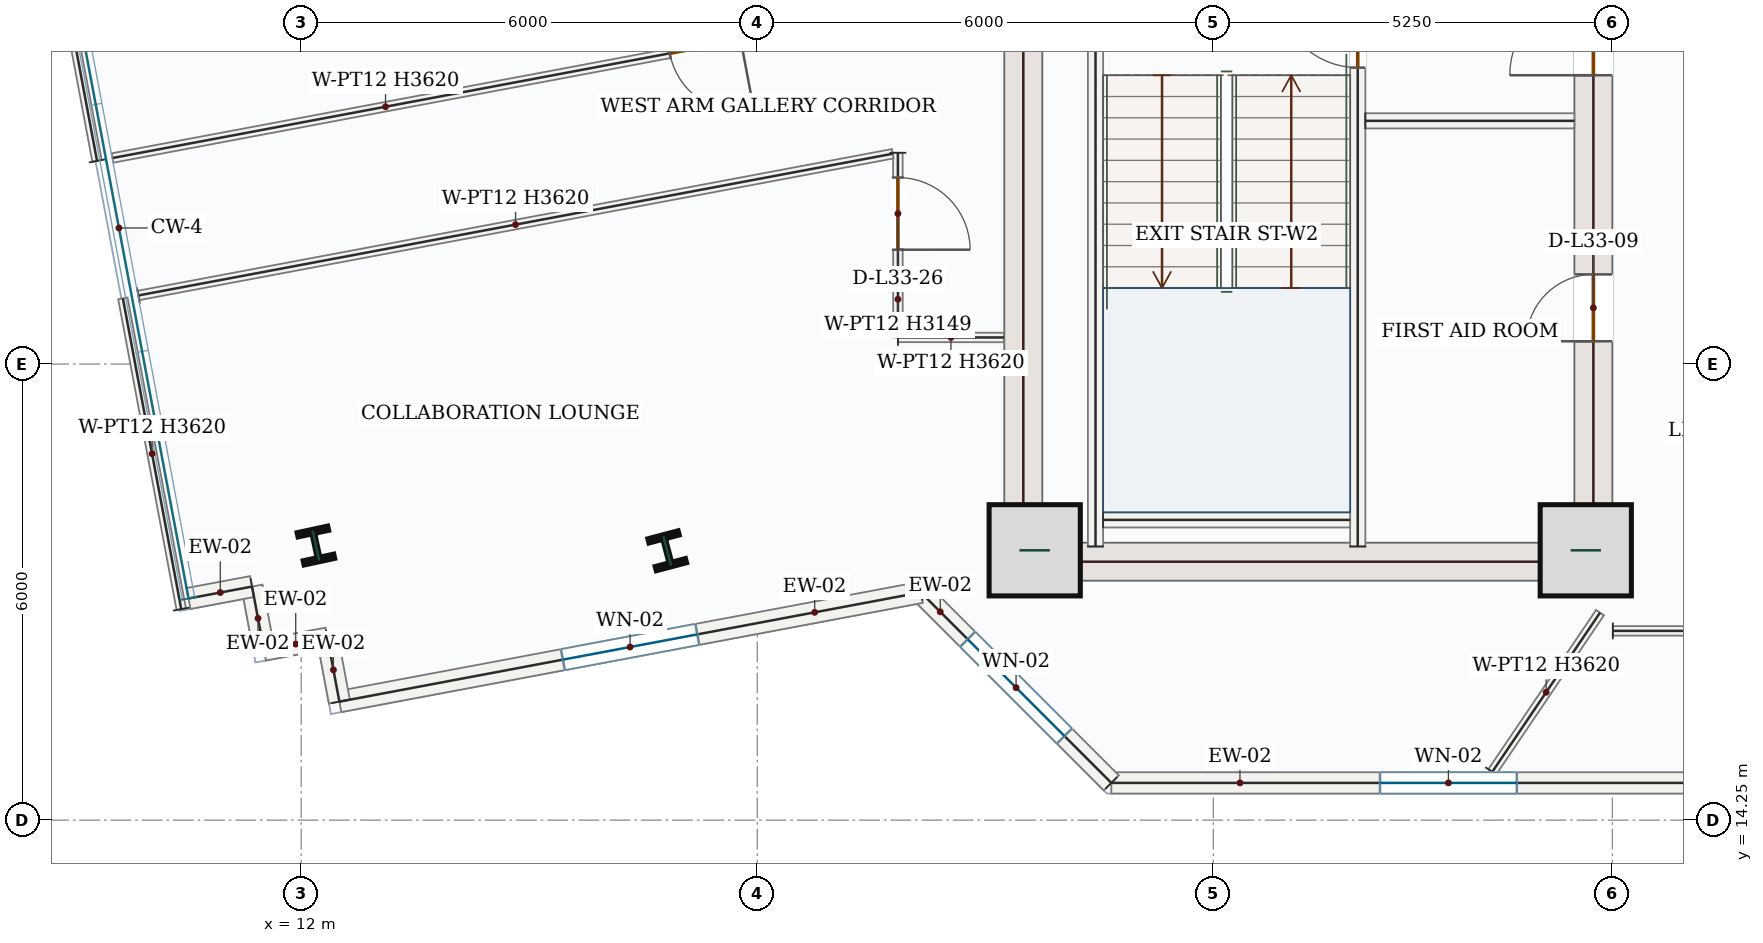
"""IFC4 building model, lengths in metres.
Left out: names, types, materials, properties, quantities, classifications, styles, units other than length and angle.
Written with IfcOpenShell. Run it as: python <this file> out.ifc"""

import sys

from ifc_helpers import new_model, si_unit, direction, frame, frame_2d, origin, origin_2d, place, context, subcontext, project, spatial, rectangle, i_section, extrude, source, transform, mapped, element, fill, save


model = new_model("IFC4")
c1 = context("Model", 3, precision=1e-05, world=origin(), true_north=direction((0.0, 1.0)))
c2 = subcontext(c1, "Body", "Model", "MODEL_VIEW")
j1 = project(units=[si_unit("LENGTHUNIT", "METRE"), si_unit("PLANEANGLEUNIT", "RADIAN")], contexts=[c1])
p1 = place(None, origin())
s1 = spatial("IfcSite", under=j1, at=p1, CompositionType="ELEMENT")
p2 = place(p1, origin())
s2 = spatial("IfcBuilding", under=s1, at=p2, CompositionType="ELEMENT")
p3 = place(p2, frame((0.0, 0.0, 147.3)))
s3 = spatial("IfcBuildingStorey", under=s2, at=p3, CompositionType="ELEMENT", Elevation=147.3)
m1 = source(origin(), c2, "Body", "SweptSolid", [
    extrude(rectangle(XDim=8.55, YDim=0.5, at=frame_2d((4.275, 0.0))), origin(), (0.0, 0.0, 1.0), 3.62),
])
p4 = place(p3, frame((21.5, 17.4, 0.0), z_axis=(0.0, 0.0, 1.0), x_axis=(0.0, 1.0, 0.0)))
e1 = element("IfcWall", 1, at=p4, inside=s3, PredefinedType="SHEAR", context=c2, shape_type="MappedRepresentation", body=[
    mapped(m1, transform((0.0, 0.0, 0.0), x_axis=(1.0, 0.0, 0.0), y_axis=(0.0, 1.0, 0.0), z_axis=(0.0, 0.0, 1.0), scale=1.0)),
])
p5 = place(p3, frame((29.0, 17.4, 0.0), z_axis=(0.0, 0.0, 1.0), x_axis=(0.0, 1.0, 0.0)))
e2 = element("IfcWall", 2, at=p5, inside=s3, PredefinedType="SHEAR", context=c2, shape_type="SweptSolid", body=[
    extrude(rectangle(XDim=8.55, YDim=0.5, at=frame_2d((4.275, 0.0))), origin(), (0.0, 0.0, 1.0), 3.62),
])
p6 = place(p5, frame((6.65, 0.0, 0.0)))
e3 = element("IfcOpeningElement", 3, at=p6, cuts=e2, PredefinedType="OPENING", context=c2, shape_type="SweptSolid", body=[
    extrude(rectangle(XDim=1.1, YDim=2.2, at=frame_2d((0.55, 1.1))), frame((0.0, 0.26, 0.0), z_axis=(0.0, -1.0, 0.0), x_axis=(1.0, 0.0, 0.0)), (0.0, 0.0, 1.0), 0.52),
])
p7 = place(p5, frame((3.15, 0.0, 0.0)))
e4 = element("IfcOpeningElement", 4, at=p7, cuts=e2, PredefinedType="OPENING", context=c2, shape_type="SweptSolid", body=[
    extrude(rectangle(XDim=0.88, YDim=2.1, at=frame_2d((0.44, 1.05))), frame((0.0, 0.26, 0.0), z_axis=(0.0, -1.0, 0.0), x_axis=(1.0, 0.0, 0.0)), (0.0, 0.0, 1.0), 0.52),
])
m2 = source(origin(), c2, "Body", "SweptSolid", [
    extrude(rectangle(XDim=7.0, YDim=0.5, at=frame_2d((3.5, 0.0))), origin(), (0.0, 0.0, 1.0), 3.62),
])
p8 = place(p3, frame((21.75, 17.65, 0.0), z_axis=(0.0, 0.0, 1.0), x_axis=(1.0, 0.0, 0.0)))
e5 = element("IfcWall", 5, at=p8, inside=s3, PredefinedType="SHEAR", context=c2, shape_type="MappedRepresentation", body=[
    mapped(m2, transform((0.0, 0.0, 0.0), x_axis=(1.0, 0.0, 0.0), y_axis=(0.0, 1.0, 0.0), z_axis=(0.0, 0.0, 1.0), scale=1.0)),
])
m3 = source(origin(), c2, "Body", "SweptSolid", [
    extrude(rectangle(XDim=1.2, YDim=1.2, at=origin_2d()), origin(), (0.0, 0.0, 1.0), 3.9),
])
for number, where, z_axis, x_axis in (
    (6, (21.65, 17.8, 0.0), (0.0, 0.0, 1.0), (1.0, 0.0, 0.0)),
    (7, (28.9, 17.8, 0.0), (0.0, 0.0, 1.0), (1.0, 0.0, 0.0)),
):
    element("IfcColumn", number, at=place(p3, frame(where, z_axis=z_axis, x_axis=x_axis)), inside=s3, PredefinedType="COLUMN", context=c2, shape_type="MappedRepresentation", body=[
        mapped(m3, transform((0.0, 0.0, 0.0), x_axis=(1.0, 0.0, 0.0), y_axis=(0.0, 1.0, 0.0), z_axis=(0.0, 0.0, 1.0), scale=1.0)),
    ])
m4 = source(origin(), c2, "Body", "SweptSolid", [
    extrude(i_section(OverallWidth=0.412, OverallDepth=0.435, WebThickness=0.036, FlangeThickness=0.057, FilletRadius=0.018, at=origin_2d()), origin(), (0.0, 0.0, 1.0), 3.9),
])
for number, where, z_axis, x_axis in (
    (8, (16.815, 17.794, 0.0), (0.0, 0.0, 1.0), (0.967, 0.255, 0.0)),
    (9, (12.193, 17.863, 0.0), (0.0, 0.0, 1.0), (0.977, 0.211, 0.0)),
):
    element("IfcColumn", number, at=place(p3, frame(where, z_axis=z_axis, x_axis=x_axis)), inside=s3, PredefinedType="COLUMN", context=c2, shape_type="MappedRepresentation", body=[
        mapped(m4, transform((0.0, 0.0, 0.0), x_axis=(1.0, 0.0, 0.0), y_axis=(0.0, 1.0, 0.0), z_axis=(0.0, 0.0, 1.0), scale=1.0)),
    ])
p9 = place(p3, frame((31.527, 14.74, 0.0), z_axis=(0.0, 0.0, 1.0), x_axis=(-1.0, 0.0, 0.0)))
e10 = element("IfcWall", 10, at=p9, inside=s3, PredefinedType="SOLIDWALL", context=c2, shape_type="SweptSolid", body=[
    extrude(rectangle(XDim=8.869, YDim=0.28, at=frame_2d((4.434, 0.0))), origin(), (0.0, 0.0, 1.0), 3.62),
])
p10 = place(p9, frame((3.534, 0.0, 0.85)))
e11 = element("IfcOpeningElement", 11, at=p10, cuts=e10, PredefinedType="OPENING", context=c2, shape_type="SweptSolid", body=[
    extrude(rectangle(XDim=1.8, YDim=1.75, at=frame_2d((0.9, 0.875))), frame((0.0, 0.15, 0.0), z_axis=(0.0, -1.0, 0.0), x_axis=(1.0, 0.0, 0.0)), (0.0, 0.0, 1.0), 0.3),
])
p11 = place(p3, frame((22.658, 14.74, 0.0), z_axis=(0.0, 0.0, 1.0), x_axis=(-0.707106781187, 0.707106781187, 0.0)))
e12 = element("IfcWall", 12, at=p11, inside=s3, PredefinedType="SOLIDWALL", context=c2, shape_type="SweptSolid", body=[
    extrude(rectangle(XDim=3.544, YDim=0.28, at=frame_2d((1.772, 0.0))), origin(), (0.0, 0.0, 1.0), 3.62),
])
p12 = place(p11, frame((0.872, 0.0, 0.85)))
e13 = element("IfcOpeningElement", 13, at=p12, cuts=e12, PredefinedType="OPENING", context=c2, shape_type="SweptSolid", body=[
    extrude(rectangle(XDim=1.8, YDim=1.75, at=frame_2d((0.9, 0.875))), frame((0.0, 0.15, 0.0), z_axis=(0.0, -1.0, 0.0), x_axis=(1.0, 0.0, 0.0)), (0.0, 0.0, 1.0), 0.3),
])
p13 = place(p3, frame((20.152, 17.246, 0.0), z_axis=(0.0, 0.0, 1.0), x_axis=(-0.982809278234, -0.18462373254, 0.0)))
e14 = element("IfcWall", 14, at=p13, inside=s3, PredefinedType="SOLIDWALL", context=c2, shape_type="SweptSolid", body=[
    extrude(rectangle(XDim=7.783, YDim=0.28, at=frame_2d((3.892, 0.0))), origin(), (0.0, 0.0, 1.0), 3.62),
])
p14 = place(p13, frame((2.992, 0.0, 0.85)))
e15 = element("IfcOpeningElement", 15, at=p14, cuts=e14, PredefinedType="OPENING", context=c2, shape_type="SweptSolid", body=[
    extrude(rectangle(XDim=1.8, YDim=1.75, at=frame_2d((0.9, 0.875))), frame((0.0, 0.15, 0.0), z_axis=(0.0, -1.0, 0.0), x_axis=(1.0, 0.0, 0.0)), (0.0, 0.0, 1.0), 0.3),
])
m5 = source(origin(), c2, "Body", "SweptSolid", [
    extrude(rectangle(XDim=0.85, YDim=0.28, at=frame_2d((0.425, 0.0))), origin(), (0.0, 0.0, 1.0), 3.62),
])
p15 = place(p3, frame((12.502, 15.809, 0.0), z_axis=(0.0, 0.0, 1.0), x_axis=(-0.184670010318, 0.982800583684, 0.0)))
e16 = element("IfcWall", 16, at=p15, inside=s3, PredefinedType="SOLIDWALL", context=c2, shape_type="MappedRepresentation", body=[
    mapped(m5, transform((0.0, 0.0, 0.0), x_axis=(1.0, 0.0, 0.0), y_axis=(0.0, 1.0, 0.0), z_axis=(0.0, 0.0, 1.0), scale=1.0)),
])
m6 = source(origin(), c2, "Body", "SweptSolid", [
    extrude(rectangle(XDim=0.85, YDim=0.28, at=frame_2d((0.425, 0.0))), origin(), (0.0, 0.0, 1.0), 3.62),
])
for number, where, z_axis, x_axis in (
    (17, (12.345, 16.645, 0.0), (0.0, 0.0, 1.0), (-0.983, -0.185, 0.0)),
    (18, (11.51, 16.488, 0.0), (0.0, 0.0, 1.0), (-0.185, 0.983, 0.0)),
):
    element("IfcWall", number, at=place(p3, frame(where, z_axis=z_axis, x_axis=x_axis)), inside=s3, PredefinedType="SOLIDWALL", context=c2, shape_type="MappedRepresentation", body=[
        mapped(m6, transform((0.0, 0.0, 0.0), x_axis=(1.0, 0.0, 0.0), y_axis=(0.0, 1.0, 0.0), z_axis=(0.0, 0.0, 1.0), scale=1.0)),
    ])
p16 = place(p3, frame((11.353, 17.323, 0.0), z_axis=(0.0, 0.0, 1.0), x_axis=(-0.982852672425, -0.184392582027, 0.0)))
e19 = element("IfcWall", 19, at=p16, inside=s3, PredefinedType="SOLIDWALL", context=c2, shape_type="MappedRepresentation", body=[
    mapped(m5, transform((0.0, 0.0, 0.0), x_axis=(1.0, 0.0, 0.0), y_axis=(0.0, 1.0, 0.0), z_axis=(0.0, 0.0, 1.0), scale=1.0)),
])
m7 = source(origin(), c2, "Body", "SweptSolid", [
    extrude(rectangle(XDim=7.87, YDim=0.2, at=frame_2d((3.935, 0.0))), origin(), (0.0, 0.0, 1.0), 3.62),
])
p17 = place(p3, frame((22.45, 17.85, 0.0), z_axis=(0.0, 0.0, 1.0), x_axis=(0.0, 1.0, 0.0)))
e20 = element("IfcWall", 20, at=p17, inside=s3, PredefinedType="SOLIDWALL", context=c2, shape_type="MappedRepresentation", body=[
    mapped(m7, transform((0.0, 0.0, 0.0), x_axis=(1.0, 0.0, 0.0), y_axis=(0.0, 1.0, 0.0), z_axis=(0.0, 0.0, 1.0), scale=1.0)),
])
p18 = place(p3, frame((25.9, 17.85, 0.0), z_axis=(0.0, 0.0, 1.0), x_axis=(0.0, 1.0, 0.0)))
e21 = element("IfcWall", 21, at=p18, inside=s3, PredefinedType="SOLIDWALL", context=c2, shape_type="SweptSolid", body=[
    extrude(rectangle(XDim=8.0, YDim=0.2, at=frame_2d((4.0, 0.0))), origin(), (0.0, 0.0, 1.0), 3.62),
])
p19 = place(p18, frame((6.3, 0.0, 0.0)))
e22 = element("IfcOpeningElement", 22, at=p19, cuts=e21, PredefinedType="OPENING", context=c2, shape_type="SweptSolid", body=[
    extrude(rectangle(XDim=1.05, YDim=2.15, at=frame_2d((0.525, 1.075))), frame((0.0, 0.11, 0.0), z_axis=(0.0, -1.0, 0.0), x_axis=(1.0, 0.0, 0.0)), (0.0, 0.0, 1.0), 0.22),
])
m8 = source(origin(), c2, "Body", "SweptSolid", [
    extrude(rectangle(XDim=3.25, YDim=0.2, at=frame_2d((1.625, 0.0))), origin(), (0.0, 0.0, 1.0), 3.62),
])
p20 = place(p3, frame((22.55, 18.2, 0.0), z_axis=(0.0, 0.0, 1.0), x_axis=(1.0, 0.0, 0.0)))
e23 = element("IfcWall", 23, at=p20, inside=s3, PredefinedType="SOLIDWALL", context=c2, shape_type="MappedRepresentation", body=[
    mapped(m8, transform((0.0, 0.0, 0.0), x_axis=(1.0, 0.0, 0.0), y_axis=(0.0, 1.0, 0.0), z_axis=(0.0, 0.0, 1.0), scale=1.0)),
])
m9 = source(origin(), c2, "Body", "SweptSolid", [
    extrude(rectangle(XDim=2.75, YDim=0.2, at=frame_2d((1.375, 0.0))), origin(), (0.0, 0.0, 1.0), 3.62),
])
p21 = place(p3, frame((26.0, 23.45, 0.0), z_axis=(0.0, 0.0, 1.0), x_axis=(1.0, 0.0, 0.0)))
e24 = element("IfcWall", 24, at=p21, inside=s3, PredefinedType="SOLIDWALL", context=c2, shape_type="MappedRepresentation", body=[
    mapped(m9, transform((0.0, 0.0, 0.0), x_axis=(1.0, 0.0, 0.0), y_axis=(0.0, 1.0, 0.0), z_axis=(0.0, 0.0, 1.0), scale=1.0)),
])
p22 = place(p3, frame((29.256, 16.74, 0.0), z_axis=(0.0, 0.0, 1.0), x_axis=(1.0, 0.0, 0.0)))
e25 = element("IfcWall", 25, at=p22, inside=s3, PredefinedType="PARTITIONING", context=c2, shape_type="SweptSolid", body=[
    extrude(rectangle(XDim=7.736, YDim=0.125, at=frame_2d((3.868, 0.0))), origin(), (0.0, 0.0, 1.0), 3.62),
])
p23 = place(p22, frame((5.293, 0.0, 0.0)))
e26 = element("IfcOpeningElement", 26, at=p23, cuts=e25, PredefinedType="OPENING", context=c2, shape_type="SweptSolid", body=[
    extrude(rectangle(XDim=0.95, YDim=2.15, at=frame_2d((0.475, 1.075))), frame((0.0, 0.073, 0.0), z_axis=(0.0, -1.0, 0.0), x_axis=(1.0, 0.0, 0.0)), (0.0, 0.0, 1.0), 0.145),
])
m10 = source(origin(), c2, "Body", "SweptSolid", [
    extrude(rectangle(XDim=2.53, YDim=0.125, at=frame_2d((1.265, 0.0))), origin(), (0.0, 0.0, 1.0), 3.62),
])
p24 = place(p3, frame((27.67, 14.885, 0.0), z_axis=(0.0, 0.0, 1.0), x_axis=(0.560455418396, 0.82818459536, 0.0)))
e27 = element("IfcWall", 27, at=p24, inside=s3, PredefinedType="PARTITIONING", context=c2, shape_type="MappedRepresentation", body=[
    mapped(m10, transform((0.0, 0.0, 0.0), x_axis=(1.0, 0.0, 0.0), y_axis=(0.0, 1.0, 0.0), z_axis=(0.0, 0.0, 1.0), scale=1.0)),
])
m11 = source(origin(), c2, "Body", "SweptSolid", [
    extrude(rectangle(XDim=4.16, YDim=0.125, at=frame_2d((2.08, 0.0))), origin(), (0.0, 0.0, 1.0), 3.62),
])
p25 = place(p3, frame((9.314, 22.923, 0.0), z_axis=(0.0, 0.0, 1.0), x_axis=(-0.184635785614, 0.982807013951, 0.0)))
e28 = element("IfcWall", 28, at=p25, inside=s3, PredefinedType="PARTITIONING", context=c2, shape_type="MappedRepresentation", body=[
    mapped(m11, transform((0.0, 0.0, 0.0), x_axis=(1.0, 0.0, 0.0), y_axis=(0.0, 1.0, 0.0), z_axis=(0.0, 0.0, 1.0), scale=1.0)),
])
p26 = place(p3, frame((19.85, 24.902, 0.0), z_axis=(0.0, 0.0, 1.0), x_axis=(-0.982804817995, -0.184647474194, 0.0)))
e29 = element("IfcWall", 29, at=p26, inside=s3, PredefinedType="PARTITIONING", context=c2, shape_type="SweptSolid", body=[
    extrude(rectangle(XDim=10.513, YDim=0.125, at=frame_2d((5.256, 0.0))), origin(), (0.0, 0.0, 1.0), 3.62),
])
p27 = place(p26, frame((2.104, 0.0, 0.0)))
e30 = element("IfcOpeningElement", 30, at=p27, cuts=e29, PredefinedType="OPENING", context=c2, shape_type="SweptSolid", body=[
    extrude(rectangle(XDim=0.95, YDim=2.15, at=frame_2d((0.475, 1.075))), frame((0.0, 0.073, 0.0), z_axis=(0.0, -1.0, 0.0), x_axis=(1.0, 0.0, 0.0)), (0.0, 0.0, 1.0), 0.145),
])
p28 = place(p3, frame((19.85, 23.03, 0.0), z_axis=(0.0, 0.0, 1.0), x_axis=(0.00040209084, -0.999999919161, 0.0)))
e31 = element("IfcWall", 31, at=p28, inside=s3, PredefinedType="PARTITIONING", context=c2, shape_type="SweptSolid", body=[
    extrude(rectangle(XDim=2.429, YDim=0.125, at=frame_2d((1.214, 0.0))), origin(), (0.0, 0.0, 1.0), 3.149),
])
p29 = place(p28, frame((0.325, 0.0, 0.0)))
e32 = element("IfcOpeningElement", 32, at=p29, cuts=e31, PredefinedType="OPENING", context=c2, shape_type="SweptSolid", body=[
    extrude(rectangle(XDim=0.95, YDim=2.15, at=frame_2d((0.475, 1.075))), frame((0.0, 0.073, 0.0), z_axis=(0.0, -1.0, 0.0), x_axis=(1.0, 0.0, 0.0)), (0.0, 0.0, 1.0), 0.145),
])
m12 = source(origin(), c2, "Body", "SweptSolid", [
    extrude(rectangle(XDim=1.394, YDim=0.125, at=frame_2d((0.697, 0.0))), origin(), (0.0, 0.0, 1.0), 3.62),
])
p30 = place(p3, frame((19.851, 20.601, 0.0), z_axis=(0.0, 0.0, 1.0), x_axis=(0.999999754632, -0.000700525222, 0.0)))
e33 = element("IfcWall", 33, at=p30, inside=s3, PredefinedType="PARTITIONING", context=c2, shape_type="MappedRepresentation", body=[
    mapped(m12, transform((0.0, 0.0, 0.0), x_axis=(1.0, 0.0, 0.0), y_axis=(0.0, 1.0, 0.0), z_axis=(0.0, 0.0, 1.0), scale=1.0)),
])
p31 = place(p3, frame((10.422, 17.026, 0.0), z_axis=(0.0, 0.0, 1.0), x_axis=(-0.184635785614, 0.982807013951, 0.0)))
e34 = element("IfcWall", 34, at=p31, inside=s3, PredefinedType="PARTITIONING", context=c2, shape_type="MappedRepresentation", body=[
    mapped(m11, transform((0.0, 0.0, 0.0), x_axis=(1.0, 0.0, 0.0), y_axis=(0.0, 1.0, 0.0), z_axis=(0.0, 0.0, 1.0), scale=1.0)),
])
m13 = source(origin(), c2, "Body", "SweptSolid", [
    extrude(rectangle(XDim=10.098, YDim=0.125, at=frame_2d((5.049, 0.0))), origin(), (0.0, 0.0, 1.0), 3.62),
])
p32 = place(p3, frame((9.858, 21.153, 0.0), z_axis=(0.0, 0.0, 1.0), x_axis=(0.982807535277, 0.1846330106, 0.0)))
e35 = element("IfcWall", 35, at=p32, inside=s3, PredefinedType="PARTITIONING", context=c2, shape_type="MappedRepresentation", body=[
    mapped(m13, transform((0.0, 0.0, 0.0), x_axis=(1.0, 0.0, 0.0), y_axis=(0.0, 1.0, 0.0), z_axis=(0.0, 0.0, 1.0), scale=1.0)),
])
m14 = source(origin(), c2, "Body", "SweptSolid", [
    extrude(rectangle(XDim=1.8, YDim=1.75, at=frame_2d((0.9, 0.875))), frame((0.0, 0.03, 0.0), z_axis=(0.0, -1.0, 0.0), x_axis=(1.0, 0.0, 0.0)), (0.0, 0.0, 1.0), 0.06),
])
p33 = place(p10, origin())
e36 = element("IfcWindow", 36, at=p33, inside=s3, PartitioningType="DOUBLE_PANEL_VERTICAL", PredefinedType="WINDOW", context=c2, shape_type="MappedRepresentation", body=[
    mapped(m14, transform((0.0, 0.0, 0.0), x_axis=(1.0, 0.0, 0.0), y_axis=(0.0, 1.0, 0.0), z_axis=(0.0, 0.0, 1.0), scale=1.0)),
])
fill(e11, e36)
p34 = place(p12, origin())
e37 = element("IfcWindow", 37, at=p34, inside=s3, PartitioningType="DOUBLE_PANEL_VERTICAL", PredefinedType="WINDOW", context=c2, shape_type="MappedRepresentation", body=[
    mapped(m14, transform((0.0, 0.0, 0.0), x_axis=(1.0, 0.0, 0.0), y_axis=(0.0, 1.0, 0.0), z_axis=(0.0, 0.0, 1.0), scale=1.0)),
])
fill(e13, e37)
p35 = place(p14, origin())
e38 = element("IfcWindow", 38, at=p35, inside=s3, PartitioningType="DOUBLE_PANEL_VERTICAL", PredefinedType="WINDOW", context=c2, shape_type="MappedRepresentation", body=[
    mapped(m14, transform((0.0, 0.0, 0.0), x_axis=(1.0, 0.0, 0.0), y_axis=(0.0, 1.0, 0.0), z_axis=(0.0, 0.0, 1.0), scale=1.0)),
])
fill(e15, e38)
m15 = source(origin(), c2, "Body", "SweptSolid", [
    extrude(rectangle(XDim=1.05, YDim=2.15, at=frame_2d((0.525, 1.075))), frame((0.0, 0.025, 0.0), z_axis=(0.0, -1.0, 0.0), x_axis=(1.0, 0.0, 0.0)), (0.0, 0.0, 1.0), 0.05),
])
p36 = place(p19, origin())
e39 = element("IfcDoor", 39, at=p36, inside=s3, OperationType="SINGLE_SWING_RIGHT", PredefinedType="DOOR", context=c2, shape_type="MappedRepresentation", body=[
    mapped(m15, transform((0.0, 0.0, 0.0), x_axis=(1.0, 0.0, 0.0), y_axis=(0.0, 1.0, 0.0), z_axis=(0.0, 0.0, 1.0), scale=1.0)),
])
fill(e22, e39)
m16 = source(origin(), c2, "Body", "SweptSolid", [
    extrude(rectangle(XDim=1.1, YDim=2.2, at=frame_2d((0.55, 1.1))), frame((0.0, 0.025, 0.0), z_axis=(0.0, -1.0, 0.0), x_axis=(1.0, 0.0, 0.0)), (0.0, 0.0, 1.0), 0.05),
])
p37 = place(p6, origin())
e40 = element("IfcDoor", 40, at=p37, inside=s3, OperationType="SINGLE_SWING_LEFT", PredefinedType="DOOR", context=c2, shape_type="MappedRepresentation", body=[
    mapped(m16, transform((0.0, 0.0, 0.0), x_axis=(1.0, 0.0, 0.0), y_axis=(0.0, 1.0, 0.0), z_axis=(0.0, 0.0, 1.0), scale=1.0)),
])
fill(e3, e40)
m17 = source(origin(), c2, "Body", "SweptSolid", [
    extrude(rectangle(XDim=0.88, YDim=2.1, at=frame_2d((0.44, 1.05))), frame((0.0, 0.025, 0.0), z_axis=(0.0, -1.0, 0.0), x_axis=(1.0, 0.0, 0.0)), (0.0, 0.0, 1.0), 0.05),
])
p38 = place(p7, origin())
e41 = element("IfcDoor", 41, at=p38, inside=s3, OperationType="SINGLE_SWING_LEFT", PredefinedType="DOOR", context=c2, shape_type="MappedRepresentation", body=[
    mapped(m17, transform((0.0, 0.0, 0.0), x_axis=(1.0, 0.0, 0.0), y_axis=(0.0, 1.0, 0.0), z_axis=(0.0, 0.0, 1.0), scale=1.0)),
])
fill(e4, e41)
m18 = source(origin(), c2, "Body", "SweptSolid", [
    extrude(rectangle(XDim=0.95, YDim=2.15, at=frame_2d((0.475, 1.075))), frame((0.0, 0.025, 0.0), z_axis=(0.0, -1.0, 0.0), x_axis=(1.0, 0.0, 0.0)), (0.0, 0.0, 1.0), 0.05),
])
p39 = place(p27, origin())
e42 = element("IfcDoor", 42, at=p39, inside=s3, OperationType="SINGLE_SWING_LEFT", PredefinedType="DOOR", context=c2, shape_type="MappedRepresentation", body=[
    mapped(m18, transform((0.0, 0.0, 0.0), x_axis=(1.0, 0.0, 0.0), y_axis=(0.0, 1.0, 0.0), z_axis=(0.0, 0.0, 1.0), scale=1.0)),
])
fill(e30, e42)
p40 = place(p29, origin())
e43 = element("IfcDoor", 43, at=p40, inside=s3, OperationType="SINGLE_SWING_RIGHT", PredefinedType="DOOR", context=c2, shape_type="MappedRepresentation", body=[
    mapped(m18, transform((0.0, 0.0, 0.0), x_axis=(1.0, 0.0, 0.0), y_axis=(0.0, 1.0, 0.0), z_axis=(0.0, 0.0, 1.0), scale=1.0)),
])
fill(e32, e43)
save(model, sys.argv[1])
